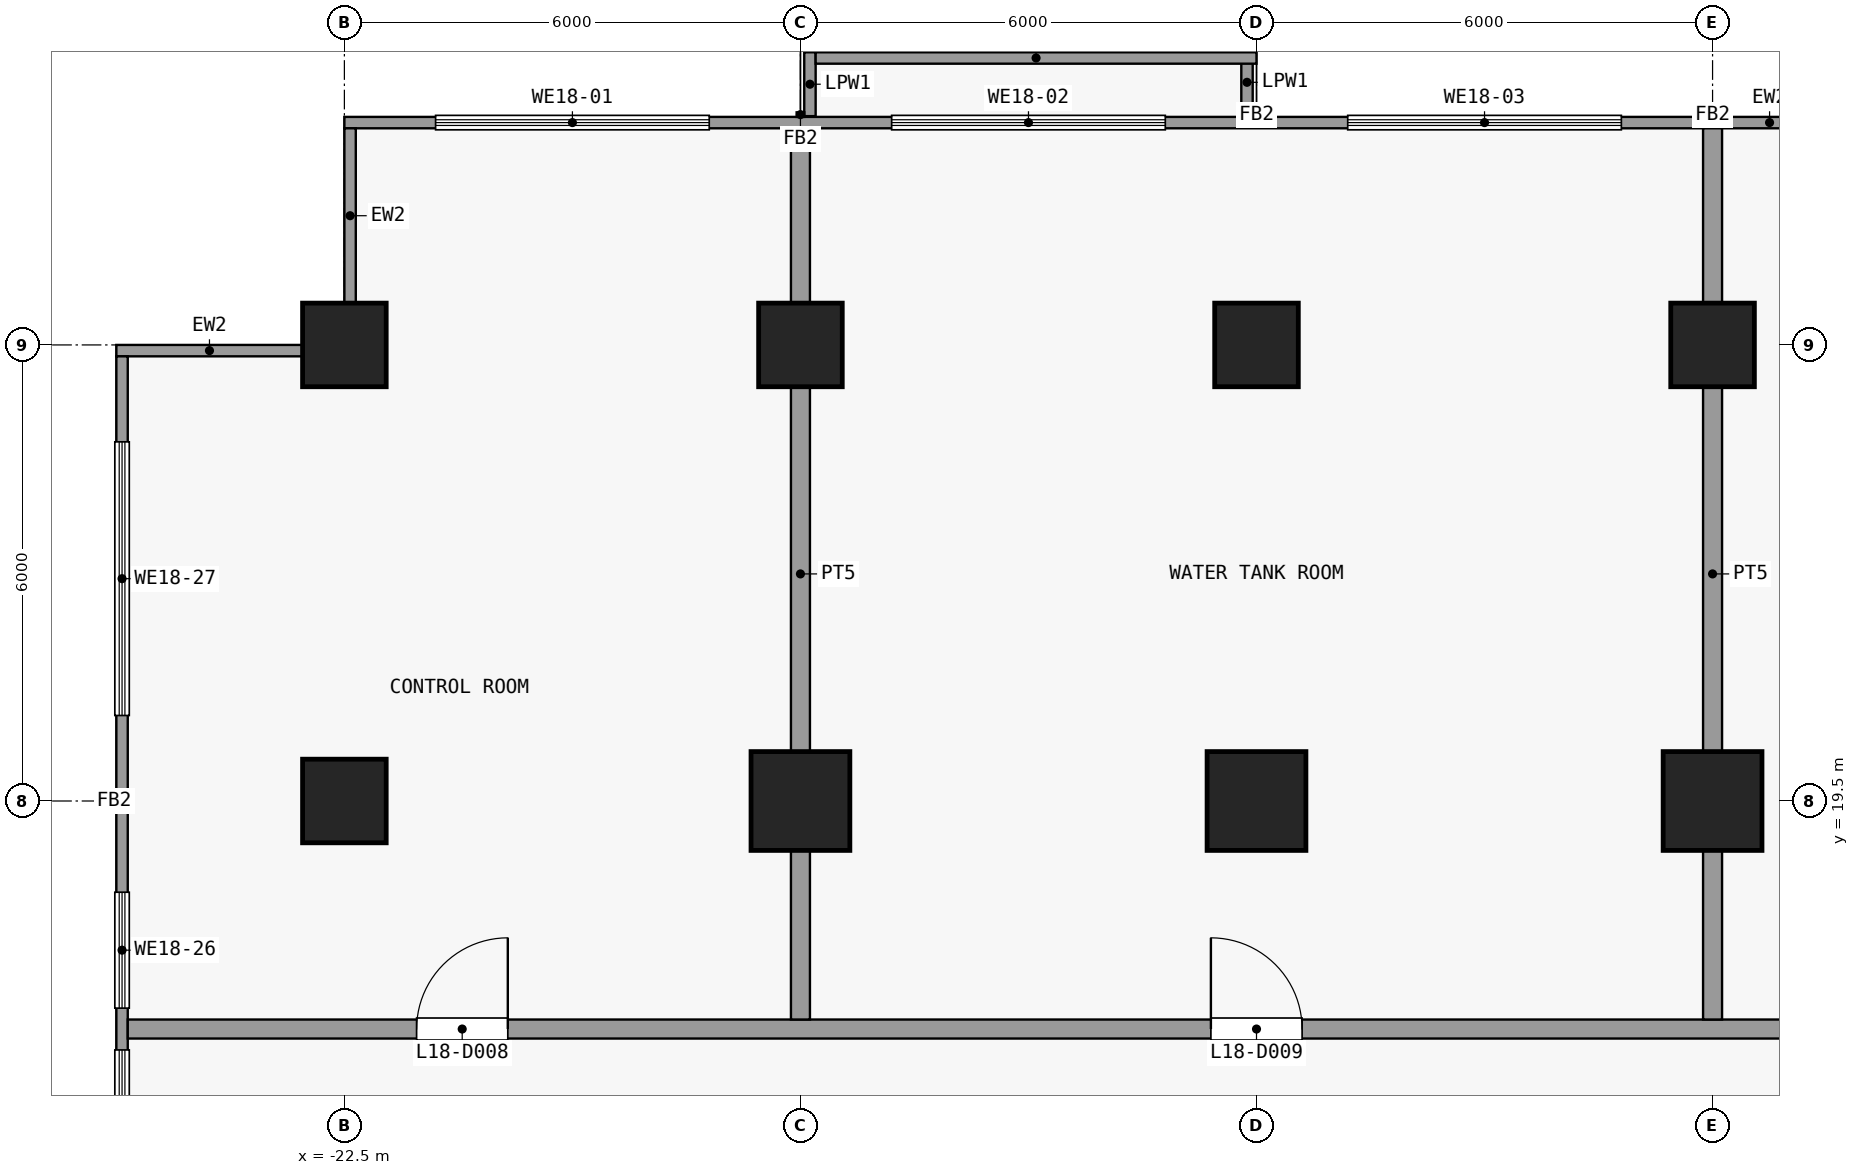
"""IFC4 building model, lengths in metres.
Left out: names, types, materials, properties, quantities, classifications, styles, units other than length and angle.
Written with IfcOpenShell. Run it as: python <this file> out.ifc"""

import sys

from ifc_helpers import new_model, si_unit, direction, frame, frame_2d, origin, origin_2d, place, context, subcontext, project, spatial, rectangle, extrude, element, fill, save


model = new_model("IFC4")
c1 = context("Model", 3, precision=1e-05, world=origin(), true_north=direction((0.0, 1.0)))
c2 = subcontext(c1, "Body", "Model", "MODEL_VIEW")
j1 = project(units=[si_unit("LENGTHUNIT", "METRE"), si_unit("PLANEANGLEUNIT", "RADIAN")], contexts=[c1])
p1 = place(None, origin())
s1 = spatial("IfcSite", under=j1, at=p1, CompositionType="ELEMENT")
p2 = place(p1, origin())
s2 = spatial("IfcBuilding", under=s1, at=p2, CompositionType="ELEMENT")
p3 = place(p2, frame((0.0, 0.0, 75.7)))
s3 = spatial("IfcBuildingStorey", under=s2, at=p3, CompositionType="ELEMENT", Elevation=75.7)
for number, where, z_axis, x_axis in (
    (1, (-22.5, 19.5, 0.0), (0.0, 0.0, 1.0), (1.0, 0.0, 0.0)),
    (2, (-22.5, 25.5, 0.0), (0.0, 0.0, 1.0), (1.0, 0.0, 0.0)),
):
    element("IfcColumn", number, at=place(p3, frame(where, z_axis=z_axis, x_axis=x_axis)), inside=s3, PredefinedType="COLUMN", context=c2, shape_type="SweptSolid", body=[
        extrude(rectangle(XDim=1.1, YDim=1.1, at=origin_2d()), origin(), (0.0, 0.0, 1.0), 5.4),
    ])
p4 = place(p3, frame((-16.5, 19.5, 0.0), z_axis=(0.0, 0.0, 1.0), x_axis=(1.0, 0.0, 0.0)))
e3 = element("IfcColumn", 3, at=p4, inside=s3, PredefinedType="COLUMN", context=c2, shape_type="SweptSolid", body=[
    extrude(rectangle(XDim=1.3, YDim=1.3, at=origin_2d()), origin(), (0.0, 0.0, 1.0), 5.4),
])
p5 = place(p3, frame((-16.5, 25.5, 0.0), z_axis=(0.0, 0.0, 1.0), x_axis=(1.0, 0.0, 0.0)))
e4 = element("IfcColumn", 4, at=p5, inside=s3, PredefinedType="COLUMN", context=c2, shape_type="SweptSolid", body=[
    extrude(rectangle(XDim=1.1, YDim=1.1, at=origin_2d()), origin(), (0.0, 0.0, 1.0), 5.4),
])
p6 = place(p3, frame((-10.5, 19.5, 0.0), z_axis=(0.0, 0.0, 1.0), x_axis=(1.0, 0.0, 0.0)))
e5 = element("IfcColumn", 5, at=p6, inside=s3, PredefinedType="COLUMN", context=c2, shape_type="SweptSolid", body=[
    extrude(rectangle(XDim=1.3, YDim=1.3, at=origin_2d()), origin(), (0.0, 0.0, 1.0), 5.4),
])
p7 = place(p3, frame((-10.5, 25.5, 0.0), z_axis=(0.0, 0.0, 1.0), x_axis=(1.0, 0.0, 0.0)))
e6 = element("IfcColumn", 6, at=p7, inside=s3, PredefinedType="COLUMN", context=c2, shape_type="SweptSolid", body=[
    extrude(rectangle(XDim=1.1, YDim=1.1, at=origin_2d()), origin(), (0.0, 0.0, 1.0), 5.4),
])
p8 = place(p3, frame((-4.5, 19.5, 0.0), z_axis=(0.0, 0.0, 1.0), x_axis=(1.0, 0.0, 0.0)))
e7 = element("IfcColumn", 7, at=p8, inside=s3, PredefinedType="COLUMN", context=c2, shape_type="SweptSolid", body=[
    extrude(rectangle(XDim=1.3, YDim=1.3, at=origin_2d()), origin(), (0.0, 0.0, 1.0), 5.4),
])
p9 = place(p3, frame((-4.5, 25.5, 0.0), z_axis=(0.0, 0.0, 1.0), x_axis=(1.0, 0.0, 0.0)))
e8 = element("IfcColumn", 8, at=p9, inside=s3, PredefinedType="COLUMN", context=c2, shape_type="SweptSolid", body=[
    extrude(rectangle(XDim=1.1, YDim=1.1, at=origin_2d()), origin(), (0.0, 0.0, 1.0), 5.4),
])
p10 = place(p3, frame((-22.5, 28.425, 0.0), z_axis=(0.0, 0.0, 1.0), x_axis=(1.0, 0.0, 0.0)))
e9 = element("IfcWall", 9, at=p10, inside=s3, PredefinedType="SOLIDWALL", context=c2, shape_type="SweptSolid", body=[
    extrude(rectangle(XDim=45.0, YDim=0.15, at=frame_2d((22.5, 0.0))), origin(), (0.0, 0.0, 1.0), 5.0),
])
p11 = place(p10, frame((1.2, 0.0, 1.2)))
e10 = element("IfcOpeningElement", 10, at=p11, cuts=e9, PredefinedType="OPENING", context=c2, shape_type="SweptSolid", body=[
    extrude(rectangle(XDim=3.6, YDim=3.0, at=frame_2d((1.8, 1.5))), frame((0.0, 0.085, 0.0), z_axis=(0.0, -1.0, 0.0), x_axis=(1.0, 0.0, 0.0)), (0.0, 0.0, 1.0), 0.17),
])
p12 = place(p10, frame((7.2, 0.0, 1.2)))
e11 = element("IfcOpeningElement", 11, at=p12, cuts=e9, PredefinedType="OPENING", context=c2, shape_type="SweptSolid", body=[
    extrude(rectangle(XDim=3.6, YDim=3.0, at=frame_2d((1.8, 1.5))), frame((0.0, 0.085, 0.0), z_axis=(0.0, -1.0, 0.0), x_axis=(1.0, 0.0, 0.0)), (0.0, 0.0, 1.0), 0.17),
])
p13 = place(p10, frame((13.2, 0.0, 1.2)))
e12 = element("IfcOpeningElement", 12, at=p13, cuts=e9, PredefinedType="OPENING", context=c2, shape_type="SweptSolid", body=[
    extrude(rectangle(XDim=3.6, YDim=3.0, at=frame_2d((1.8, 1.5))), frame((0.0, 0.085, 0.0), z_axis=(0.0, -1.0, 0.0), x_axis=(1.0, 0.0, 0.0)), (0.0, 0.0, 1.0), 0.17),
])
p14 = place(p10, frame((20.7, 0.0, 1.2)))
e13 = element("IfcOpeningElement", 13, at=p14, cuts=e9, PredefinedType="OPENING", context=c2, shape_type="SweptSolid", body=[
    extrude(rectangle(XDim=3.6, YDim=3.0, at=frame_2d((1.8, 1.5))), frame((0.0, 0.085, 0.0), z_axis=(0.0, -1.0, 0.0), x_axis=(1.0, 0.0, 0.0)), (0.0, 0.0, 1.0), 0.17),
])
p15 = place(p10, frame((28.2, 0.0, 1.2)))
e14 = element("IfcOpeningElement", 14, at=p15, cuts=e9, PredefinedType="OPENING", context=c2, shape_type="SweptSolid", body=[
    extrude(rectangle(XDim=3.6, YDim=3.0, at=frame_2d((1.8, 1.5))), frame((0.0, 0.085, 0.0), z_axis=(0.0, -1.0, 0.0), x_axis=(1.0, 0.0, 0.0)), (0.0, 0.0, 1.0), 0.17),
])
p16 = place(p10, frame((34.2, 0.0, 1.2)))
e15 = element("IfcOpeningElement", 15, at=p16, cuts=e9, PredefinedType="OPENING", context=c2, shape_type="SweptSolid", body=[
    extrude(rectangle(XDim=3.6, YDim=3.0, at=frame_2d((1.8, 1.5))), frame((0.0, 0.085, 0.0), z_axis=(0.0, -1.0, 0.0), x_axis=(1.0, 0.0, 0.0)), (0.0, 0.0, 1.0), 0.17),
])
p17 = place(p10, frame((40.2, 0.0, 1.2)))
e16 = element("IfcOpeningElement", 16, at=p17, cuts=e9, PredefinedType="OPENING", context=c2, shape_type="SweptSolid", body=[
    extrude(rectangle(XDim=3.6, YDim=3.0, at=frame_2d((1.8, 1.5))), frame((0.0, 0.085, 0.0), z_axis=(0.0, -1.0, 0.0), x_axis=(1.0, 0.0, 0.0)), (0.0, 0.0, 1.0), 0.17),
])
p18 = place(p3, frame((-25.425, -22.35, 0.0), z_axis=(0.0, 0.0, 1.0), x_axis=(0.0, 1.0, 0.0)))
e17 = element("IfcWall", 17, at=p18, inside=s3, PredefinedType="SOLIDWALL", context=c2, shape_type="SweptSolid", body=[
    extrude(rectangle(XDim=47.7, YDim=0.15, at=frame_2d((23.85, 0.0))), origin(), (0.0, 0.0, 1.0), 5.2),
])
p19 = place(p18, frame((2.625, 0.0, 1.2)))
e18 = element("IfcOpeningElement", 18, at=p19, cuts=e17, PredefinedType="OPENING", context=c2, shape_type="SweptSolid", body=[
    extrude(rectangle(XDim=3.6, YDim=3.0, at=frame_2d((1.8, 1.5))), frame((0.0, 0.085, 0.0), z_axis=(0.0, -1.0, 0.0), x_axis=(1.0, 0.0, 0.0)), (0.0, 0.0, 1.0), 0.17),
])
p20 = place(p18, frame((11.55, 0.0, 1.2)))
e19 = element("IfcOpeningElement", 19, at=p20, cuts=e17, PredefinedType="OPENING", context=c2, shape_type="SweptSolid", body=[
    extrude(rectangle(XDim=2.625, YDim=3.0, at=frame_2d((1.312, 1.5))), frame((0.0, 0.085, 0.0), z_axis=(0.0, -1.0, 0.0), x_axis=(1.0, 0.0, 0.0)), (0.0, 0.0, 1.0), 0.17),
])
p21 = place(p18, frame((19.05, 0.0, 1.2)))
e20 = element("IfcOpeningElement", 20, at=p21, cuts=e17, PredefinedType="OPENING", context=c2, shape_type="SweptSolid", body=[
    extrude(rectangle(XDim=3.6, YDim=3.0, at=frame_2d((1.8, 1.5))), frame((0.0, 0.085, 0.0), z_axis=(0.0, -1.0, 0.0), x_axis=(1.0, 0.0, 0.0)), (0.0, 0.0, 1.0), 0.17),
])
p22 = place(p18, frame((25.05, 0.0, 1.2)))
e21 = element("IfcOpeningElement", 21, at=p22, cuts=e17, PredefinedType="OPENING", context=c2, shape_type="SweptSolid", body=[
    extrude(rectangle(XDim=3.6, YDim=3.0, at=frame_2d((1.8, 1.5))), frame((0.0, 0.085, 0.0), z_axis=(0.0, -1.0, 0.0), x_axis=(1.0, 0.0, 0.0)), (0.0, 0.0, 1.0), 0.17),
])
p23 = place(p18, frame((31.05, 0.0, 1.2)))
e22 = element("IfcOpeningElement", 22, at=p23, cuts=e17, PredefinedType="OPENING", context=c2, shape_type="SweptSolid", body=[
    extrude(rectangle(XDim=3.6, YDim=3.0, at=frame_2d((1.8, 1.5))), frame((0.0, 0.085, 0.0), z_axis=(0.0, -1.0, 0.0), x_axis=(1.0, 0.0, 0.0)), (0.0, 0.0, 1.0), 0.17),
])
p24 = place(p18, frame((37.05, 0.0, 1.2)))
e23 = element("IfcOpeningElement", 23, at=p24, cuts=e17, PredefinedType="OPENING", context=c2, shape_type="SweptSolid", body=[
    extrude(rectangle(XDim=1.525, YDim=3.0, at=frame_2d((0.762, 1.5))), frame((0.0, 0.085, 0.0), z_axis=(0.0, -1.0, 0.0), x_axis=(1.0, 0.0, 0.0)), (0.0, 0.0, 1.0), 0.17),
])
p25 = place(p18, frame((39.125, 0.0, 1.2)))
e24 = element("IfcOpeningElement", 24, at=p25, cuts=e17, PredefinedType="OPENING", context=c2, shape_type="SweptSolid", body=[
    extrude(rectangle(XDim=1.525, YDim=3.0, at=frame_2d((0.762, 1.5))), frame((0.0, 0.085, 0.0), z_axis=(0.0, -1.0, 0.0), x_axis=(1.0, 0.0, 0.0)), (0.0, 0.0, 1.0), 0.17),
])
p26 = place(p18, frame((42.975, 0.0, 1.2)))
e25 = element("IfcOpeningElement", 25, at=p26, cuts=e17, PredefinedType="OPENING", context=c2, shape_type="SweptSolid", body=[
    extrude(rectangle(XDim=3.6, YDim=3.0, at=frame_2d((1.8, 1.5))), frame((0.0, 0.085, 0.0), z_axis=(0.0, -1.0, 0.0), x_axis=(1.0, 0.0, 0.0)), (0.0, 0.0, 1.0), 0.17),
])
p27 = place(p3, frame((-22.425, 26.05, 0.0), z_axis=(0.0, 0.0, 1.0), x_axis=(0.0, 1.0, 0.0)))
e26 = element("IfcWall", 26, at=p27, inside=s3, PredefinedType="SOLIDWALL", context=c2, shape_type="SweptSolid", body=[
    extrude(rectangle(XDim=2.3, YDim=0.15, at=frame_2d((1.15, 0.0))), origin(), (0.0, 0.0, 1.0), 5.0),
])
p28 = place(p3, frame((-25.5, 25.425, 0.0), z_axis=(0.0, 0.0, 1.0), x_axis=(1.0, 0.0, 0.0)))
e27 = element("IfcWall", 27, at=p28, inside=s3, PredefinedType="SOLIDWALL", context=c2, shape_type="SweptSolid", body=[
    extrude(rectangle(XDim=2.45, YDim=0.15, at=frame_2d((1.225, 0.0))), origin(), (0.0, 0.0, 1.0), 5.0),
])
p29 = place(p3, frame((-10.625, 29.4, 0.0), z_axis=(0.0, 0.0, 1.0), x_axis=(0.0, -1.0, 0.0)))
e28 = element("IfcWall", 28, at=p29, inside=s3, PredefinedType="PARAPET", context=c2, shape_type="SweptSolid", body=[
    extrude(rectangle(XDim=0.89, YDim=0.15, at=frame_2d((0.445, 0.0))), origin(), (0.0, 0.0, 1.0), 1.15),
])
p30 = place(p3, frame((-16.375, 28.51, 0.0), z_axis=(0.0, 0.0, 1.0), x_axis=(0.0, 1.0, 0.0)))
e29 = element("IfcWall", 29, at=p30, inside=s3, PredefinedType="PARAPET", context=c2, shape_type="SweptSolid", body=[
    extrude(rectangle(XDim=0.84, YDim=0.15, at=frame_2d((0.42, 0.0))), origin(), (0.0, 0.0, 1.0), 1.15),
])
p31 = place(p3, frame((-16.3, 29.275, 0.0), z_axis=(0.0, 0.0, 1.0), x_axis=(1.0, 0.0, 0.0)))
e30 = element("IfcWall", 30, at=p31, inside=s3, PredefinedType="PARAPET", context=c2, shape_type="SweptSolid", body=[
    extrude(rectangle(XDim=5.8, YDim=0.15, at=frame_2d((2.9, 0.0))), origin(), (0.0, 0.0, 1.0), 1.15),
])
p32 = place(p3, frame((-25.35, 16.5, 0.0), z_axis=(0.0, 0.0, 1.0), x_axis=(1.0, 0.0, 0.0)))
e31 = element("IfcWall", 31, at=p32, inside=s3, PredefinedType="PARTITIONING", context=c2, shape_type="SweptSolid", body=[
    extrude(rectangle(XDim=50.7, YDim=0.25, at=frame_2d((25.35, 0.0))), origin(), (0.0, 0.0, 1.0), 5.0),
])
p33 = place(p32, frame((3.8, 0.0, 0.0)))
e32 = element("IfcOpeningElement", 32, at=p33, cuts=e31, PredefinedType="OPENING", context=c2, shape_type="SweptSolid", body=[
    extrude(rectangle(XDim=1.2, YDim=2.1, at=frame_2d((0.6, 1.05))), frame((0.0, 0.135, 0.0), z_axis=(0.0, -1.0, 0.0), x_axis=(1.0, 0.0, 0.0)), (0.0, 0.0, 1.0), 0.27),
])
p34 = place(p32, frame((14.25, 0.0, 0.0)))
e33 = element("IfcOpeningElement", 33, at=p34, cuts=e31, PredefinedType="OPENING", context=c2, shape_type="SweptSolid", body=[
    extrude(rectangle(XDim=1.2, YDim=2.1, at=frame_2d((0.6, 1.05))), frame((0.0, 0.135, 0.0), z_axis=(0.0, -1.0, 0.0), x_axis=(1.0, 0.0, 0.0)), (0.0, 0.0, 1.0), 0.27),
])
p35 = place(p32, frame((24.75, 0.0, 0.0)))
e34 = element("IfcOpeningElement", 34, at=p35, cuts=e31, PredefinedType="OPENING", context=c2, shape_type="SweptSolid", body=[
    extrude(rectangle(XDim=1.2, YDim=2.1, at=frame_2d((0.6, 1.05))), frame((0.0, 0.135, 0.0), z_axis=(0.0, -1.0, 0.0), x_axis=(1.0, 0.0, 0.0)), (0.0, 0.0, 1.0), 0.27),
])
p36 = place(p32, frame((35.25, 0.0, 0.0)))
e35 = element("IfcOpeningElement", 35, at=p36, cuts=e31, PredefinedType="OPENING", context=c2, shape_type="SweptSolid", body=[
    extrude(rectangle(XDim=1.2, YDim=2.1, at=frame_2d((0.6, 1.05))), frame((0.0, 0.135, 0.0), z_axis=(0.0, -1.0, 0.0), x_axis=(1.0, 0.0, 0.0)), (0.0, 0.0, 1.0), 0.27),
])
p37 = place(p32, frame((45.65, 0.0, 0.0)))
e36 = element("IfcOpeningElement", 36, at=p37, cuts=e31, PredefinedType="OPENING", context=c2, shape_type="SweptSolid", body=[
    extrude(rectangle(XDim=1.2, YDim=2.1, at=frame_2d((0.6, 1.05))), frame((0.0, 0.135, 0.0), z_axis=(0.0, -1.0, 0.0), x_axis=(1.0, 0.0, 0.0)), (0.0, 0.0, 1.0), 0.27),
])
for number, where, z_axis, x_axis in (
    (37, (-16.5, 16.625, 0.0), (0.0, 0.0, 1.0), (0.0, 1.0, 0.0)),
    (38, (-4.5, 16.625, 0.0), (0.0, 0.0, 1.0), (0.0, 1.0, 0.0)),
):
    element("IfcWall", number, at=place(p3, frame(where, z_axis=z_axis, x_axis=x_axis)), inside=s3, PredefinedType="PARTITIONING", context=c2, shape_type="SweptSolid", body=[
        extrude(rectangle(XDim=11.725, YDim=0.25, at=frame_2d((5.863, 0.0))), origin(), (0.0, 0.0, 1.0), 5.0),
    ])
p38 = place(p11, origin())
e39 = element("IfcWindow", 39, at=p38, inside=s3, PartitioningType="SINGLE_PANEL", PredefinedType="WINDOW", context=c2, shape_type="SweptSolid", body=[
    extrude(rectangle(XDim=3.6, YDim=3.0, at=frame_2d((1.8, 1.5))), frame((0.0, 0.03, 0.0), z_axis=(0.0, -1.0, 0.0), x_axis=(1.0, 0.0, 0.0)), (0.0, 0.0, 1.0), 0.06),
])
fill(e10, e39)
p39 = place(p12, origin())
e40 = element("IfcWindow", 40, at=p39, inside=s3, PartitioningType="SINGLE_PANEL", PredefinedType="WINDOW", context=c2, shape_type="SweptSolid", body=[
    extrude(rectangle(XDim=3.6, YDim=3.0, at=frame_2d((1.8, 1.5))), frame((0.0, 0.03, 0.0), z_axis=(0.0, -1.0, 0.0), x_axis=(1.0, 0.0, 0.0)), (0.0, 0.0, 1.0), 0.06),
])
fill(e11, e40)
p40 = place(p13, origin())
e41 = element("IfcWindow", 41, at=p40, inside=s3, PartitioningType="SINGLE_PANEL", PredefinedType="WINDOW", context=c2, shape_type="SweptSolid", body=[
    extrude(rectangle(XDim=3.6, YDim=3.0, at=frame_2d((1.8, 1.5))), frame((0.0, 0.03, 0.0), z_axis=(0.0, -1.0, 0.0), x_axis=(1.0, 0.0, 0.0)), (0.0, 0.0, 1.0), 0.06),
])
fill(e12, e41)
p41 = place(p24, origin())
e42 = element("IfcWindow", 42, at=p41, inside=s3, PartitioningType="SINGLE_PANEL", PredefinedType="WINDOW", context=c2, shape_type="SweptSolid", body=[
    extrude(rectangle(XDim=1.525, YDim=3.0, at=frame_2d((0.762, 1.5))), frame((0.0, 0.03, 0.0), z_axis=(0.0, -1.0, 0.0), x_axis=(1.0, 0.0, 0.0)), (0.0, 0.0, 1.0), 0.06),
])
fill(e23, e42)
p42 = place(p25, origin())
e43 = element("IfcWindow", 43, at=p42, inside=s3, PartitioningType="SINGLE_PANEL", PredefinedType="WINDOW", context=c2, shape_type="SweptSolid", body=[
    extrude(rectangle(XDim=1.525, YDim=3.0, at=frame_2d((0.762, 1.5))), frame((0.0, 0.03, 0.0), z_axis=(0.0, -1.0, 0.0), x_axis=(1.0, 0.0, 0.0)), (0.0, 0.0, 1.0), 0.06),
])
fill(e24, e43)
p43 = place(p26, origin())
e44 = element("IfcWindow", 44, at=p43, inside=s3, PartitioningType="SINGLE_PANEL", PredefinedType="WINDOW", context=c2, shape_type="SweptSolid", body=[
    extrude(rectangle(XDim=3.6, YDim=3.0, at=frame_2d((1.8, 1.5))), frame((0.0, 0.03, 0.0), z_axis=(0.0, -1.0, 0.0), x_axis=(1.0, 0.0, 0.0)), (0.0, 0.0, 1.0), 0.06),
])
fill(e25, e44)
p44 = place(p33, origin())
e45 = element("IfcDoor", 45, at=p44, inside=s3, OperationType="SINGLE_SWING_LEFT", PredefinedType="DOOR", context=c2, shape_type="SweptSolid", body=[
    extrude(rectangle(XDim=1.2, YDim=2.1, at=frame_2d((0.6, 1.05))), frame((0.0, 0.025, 0.0), z_axis=(0.0, -1.0, 0.0), x_axis=(1.0, 0.0, 0.0)), (0.0, 0.0, 1.0), 0.05),
])
fill(e32, e45)
p45 = place(p34, origin())
e46 = element("IfcDoor", 46, at=p45, inside=s3, OperationType="SINGLE_SWING_RIGHT", PredefinedType="DOOR", context=c2, shape_type="SweptSolid", body=[
    extrude(rectangle(XDim=1.2, YDim=2.1, at=frame_2d((0.6, 1.05))), frame((0.0, 0.025, 0.0), z_axis=(0.0, -1.0, 0.0), x_axis=(1.0, 0.0, 0.0)), (0.0, 0.0, 1.0), 0.05),
])
fill(e33, e46)
save(model, sys.argv[1])
